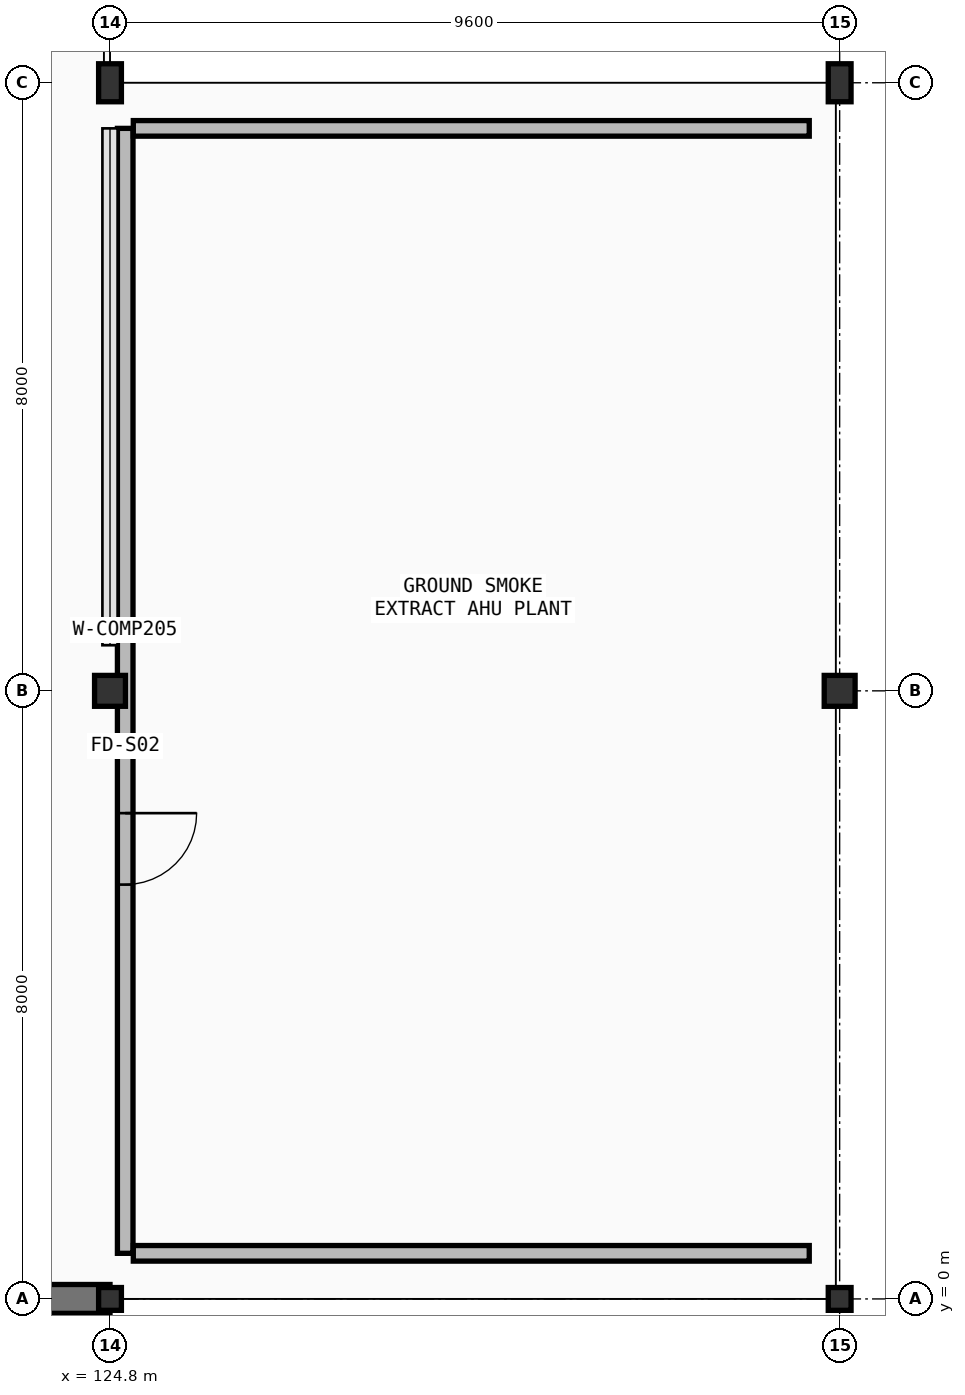
"""IFC4 building model, lengths in metres.
Left out: names, types, materials, properties, quantities, classifications, styles, units other than length and angle.
Written with IfcOpenShell. Run it as: python <this file> out.ifc"""

import sys

from ifc_helpers import new_model, si_unit, direction, frame, frame_2d, origin, origin_2d, place, context, subcontext, project, spatial, rectangle, hollow_circle, i_section, extrude, element, fill, save


model = new_model("IFC4")
c1 = context("Model", 3, precision=1e-05, world=origin(), true_north=direction((0.0, 1.0)))
c2 = subcontext(c1, "Body", "Model", "MODEL_VIEW")
j1 = project(units=[si_unit("LENGTHUNIT", "METRE"), si_unit("PLANEANGLEUNIT", "RADIAN")], contexts=[c1])
p1 = place(None, origin())
s1 = spatial("IfcSite", under=j1, at=p1, CompositionType="ELEMENT")
p2 = place(p1, origin())
s2 = spatial("IfcBuilding", under=s1, at=p2, CompositionType="ELEMENT")
p3 = place(p2, origin())
s3 = spatial("IfcBuildingStorey", under=s2, at=p3, CompositionType="ELEMENT", Elevation=0.0)
p4 = place(p3, frame((124.8, 0.0, -5.4), z_axis=(0.0, 0.0, 1.0), x_axis=(1.0, 0.0, 0.0)))
e1 = element("IfcColumn", 1, at=p4, inside=s3, PredefinedType="COLUMN", context=c2, shape_type="SweptSolid", body=[
    extrude(i_section(OverallWidth=0.3, OverallDepth=0.3, WebThickness=0.011, FlangeThickness=0.019, FilletRadius=0.027, at=origin_2d()), origin(), (0.0, 0.0, 1.0), 11.4),
])
p5 = place(p3, frame((124.8, 8.0, 0.0), z_axis=(0.0, 0.0, 1.0), x_axis=(1.0, 0.0, 0.0)))
e2 = element("IfcColumn", 2, at=p5, inside=s3, PredefinedType="COLUMN", context=c2, shape_type="SweptSolid", body=[
    extrude(hollow_circle(Radius=0.203, WallThickness=0.02, at=origin_2d()), origin(), (0.0, 0.0, 1.0), 6.0),
])
p6 = place(p3, frame((124.8, 16.0, 0.0), z_axis=(0.0, 0.0, 1.0), x_axis=(1.0, 0.0, 0.0)))
e3 = element("IfcColumn", 3, at=p6, inside=s3, PredefinedType="COLUMN", context=c2, shape_type="SweptSolid", body=[
    extrude(i_section(OverallWidth=0.3, OverallDepth=0.5, WebThickness=0.014, FlangeThickness=0.028, FilletRadius=0.027, at=origin_2d()), origin(), (0.0, 0.0, 1.0), 6.0),
])
p7 = place(p3, frame((134.4, 0.0, -5.4), z_axis=(0.0, 0.0, 1.0), x_axis=(1.0, 0.0, 0.0)))
e4 = element("IfcColumn", 4, at=p7, inside=s3, PredefinedType="COLUMN", context=c2, shape_type="SweptSolid", body=[
    extrude(i_section(OverallWidth=0.3, OverallDepth=0.3, WebThickness=0.011, FlangeThickness=0.019, FilletRadius=0.027, at=origin_2d()), origin(), (0.0, 0.0, 1.0), 11.4),
])
p8 = place(p3, frame((134.4, 8.0, 0.0), z_axis=(0.0, 0.0, 1.0), x_axis=(1.0, 0.0, 0.0)))
e5 = element("IfcColumn", 5, at=p8, inside=s3, PredefinedType="COLUMN", context=c2, shape_type="SweptSolid", body=[
    extrude(hollow_circle(Radius=0.203, WallThickness=0.02, at=origin_2d()), origin(), (0.0, 0.0, 1.0), 6.0),
])
p9 = place(p3, frame((134.4, 16.0, 0.0), z_axis=(0.0, 0.0, 1.0), x_axis=(1.0, 0.0, 0.0)))
e6 = element("IfcColumn", 6, at=p9, inside=s3, PredefinedType="COLUMN", context=c2, shape_type="SweptSolid", body=[
    extrude(i_section(OverallWidth=0.3, OverallDepth=0.5, WebThickness=0.014, FlangeThickness=0.028, FilletRadius=0.027, at=origin_2d()), origin(), (0.0, 0.0, 1.0), 6.0),
])
p10 = place(p3, frame((115.2, 0.0, 0.0), z_axis=(0.0, 0.0, 1.0), x_axis=(1.0, 0.0, 0.0)))
e7 = element("IfcWall", 7, at=p10, inside=s3, PredefinedType="SOLIDWALL", context=c2, shape_type="SweptSolid", body=[
    extrude(rectangle(XDim=9.6, YDim=0.38, at=frame_2d((4.8, 0.0))), origin(), (0.0, 0.0, 1.0), 5.55),
])
p11 = place(p10, frame((3.56, 0.0, 0.0)))
e8 = element("IfcOpeningElement", 8, at=p11, cuts=e7, PredefinedType="OPENING", context=c2, shape_type="SweptSolid", body=[
    extrude(rectangle(XDim=2.48, YDim=2.52, at=frame_2d((1.24, 1.26))), frame((0.0, 0.2, 0.0), z_axis=(0.0, -1.0, 0.0), x_axis=(1.0, 0.0, 0.0)), (0.0, 0.0, 1.0), 0.4),
])
p12 = place(p3, frame((125.0, 15.4, 0.0), z_axis=(0.0, 0.0, 1.0), x_axis=(0.0, -1.0, 0.0)))
e9 = element("IfcWall", 9, at=p12, inside=s3, PredefinedType="SOLIDWALL", context=c2, shape_type="SweptSolid", body=[
    extrude(rectangle(XDim=14.8, YDim=0.205, at=frame_2d((7.4, 0.0))), origin(), (0.0, 0.0, 1.0), 5.14),
])
p13 = place(p12, frame((9.009, 0.0, 0.0)))
e10 = element("IfcOpeningElement", 10, at=p13, cuts=e9, PredefinedType="OPENING", context=c2, shape_type="SweptSolid", body=[
    extrude(rectangle(XDim=0.94, YDim=2.1, at=frame_2d((0.47, 1.05))), frame((0.0, 0.113, 0.0), z_axis=(0.0, -1.0, 0.0), x_axis=(1.0, 0.0, 0.0)), (0.0, 0.0, 1.0), 0.225),
])
p14 = place(p3, frame((125.106, 0.6, 0.0), z_axis=(0.0, 0.0, 1.0), x_axis=(1.0, 0.0, 0.0)))
e11 = element("IfcWall", 11, at=p14, inside=s3, PredefinedType="SOLIDWALL", context=c2, shape_type="SweptSolid", body=[
    extrude(rectangle(XDim=8.894, YDim=0.205, at=frame_2d((4.447, 0.0))), origin(), (0.0, 0.0, 1.0), 6.0),
])
p15 = place(p3, frame((134.0, 15.4, 0.0), z_axis=(0.0, 0.0, 1.0), x_axis=(-1.0, 0.0, 0.0)))
e12 = element("IfcWall", 12, at=p15, inside=s3, PredefinedType="SOLIDWALL", context=c2, shape_type="SweptSolid", body=[
    extrude(rectangle(XDim=8.894, YDim=0.205, at=frame_2d((4.447, 0.0))), origin(), (0.0, 0.0, 1.0), 5.77),
])
p16 = place(p13, origin())
e13 = element("IfcDoor", 13, at=p16, inside=s3, OperationType="SINGLE_SWING_RIGHT", PredefinedType="DOOR", context=c2, shape_type="SweptSolid", body=[
    extrude(rectangle(XDim=0.94, YDim=2.1, at=frame_2d((0.47, 1.05))), frame((0.0, 0.025, 0.0), z_axis=(0.0, -1.0, 0.0), x_axis=(1.0, 0.0, 0.0)), (0.0, 0.0, 1.0), 0.05),
])
fill(e10, e13)
save(model, sys.argv[1])
